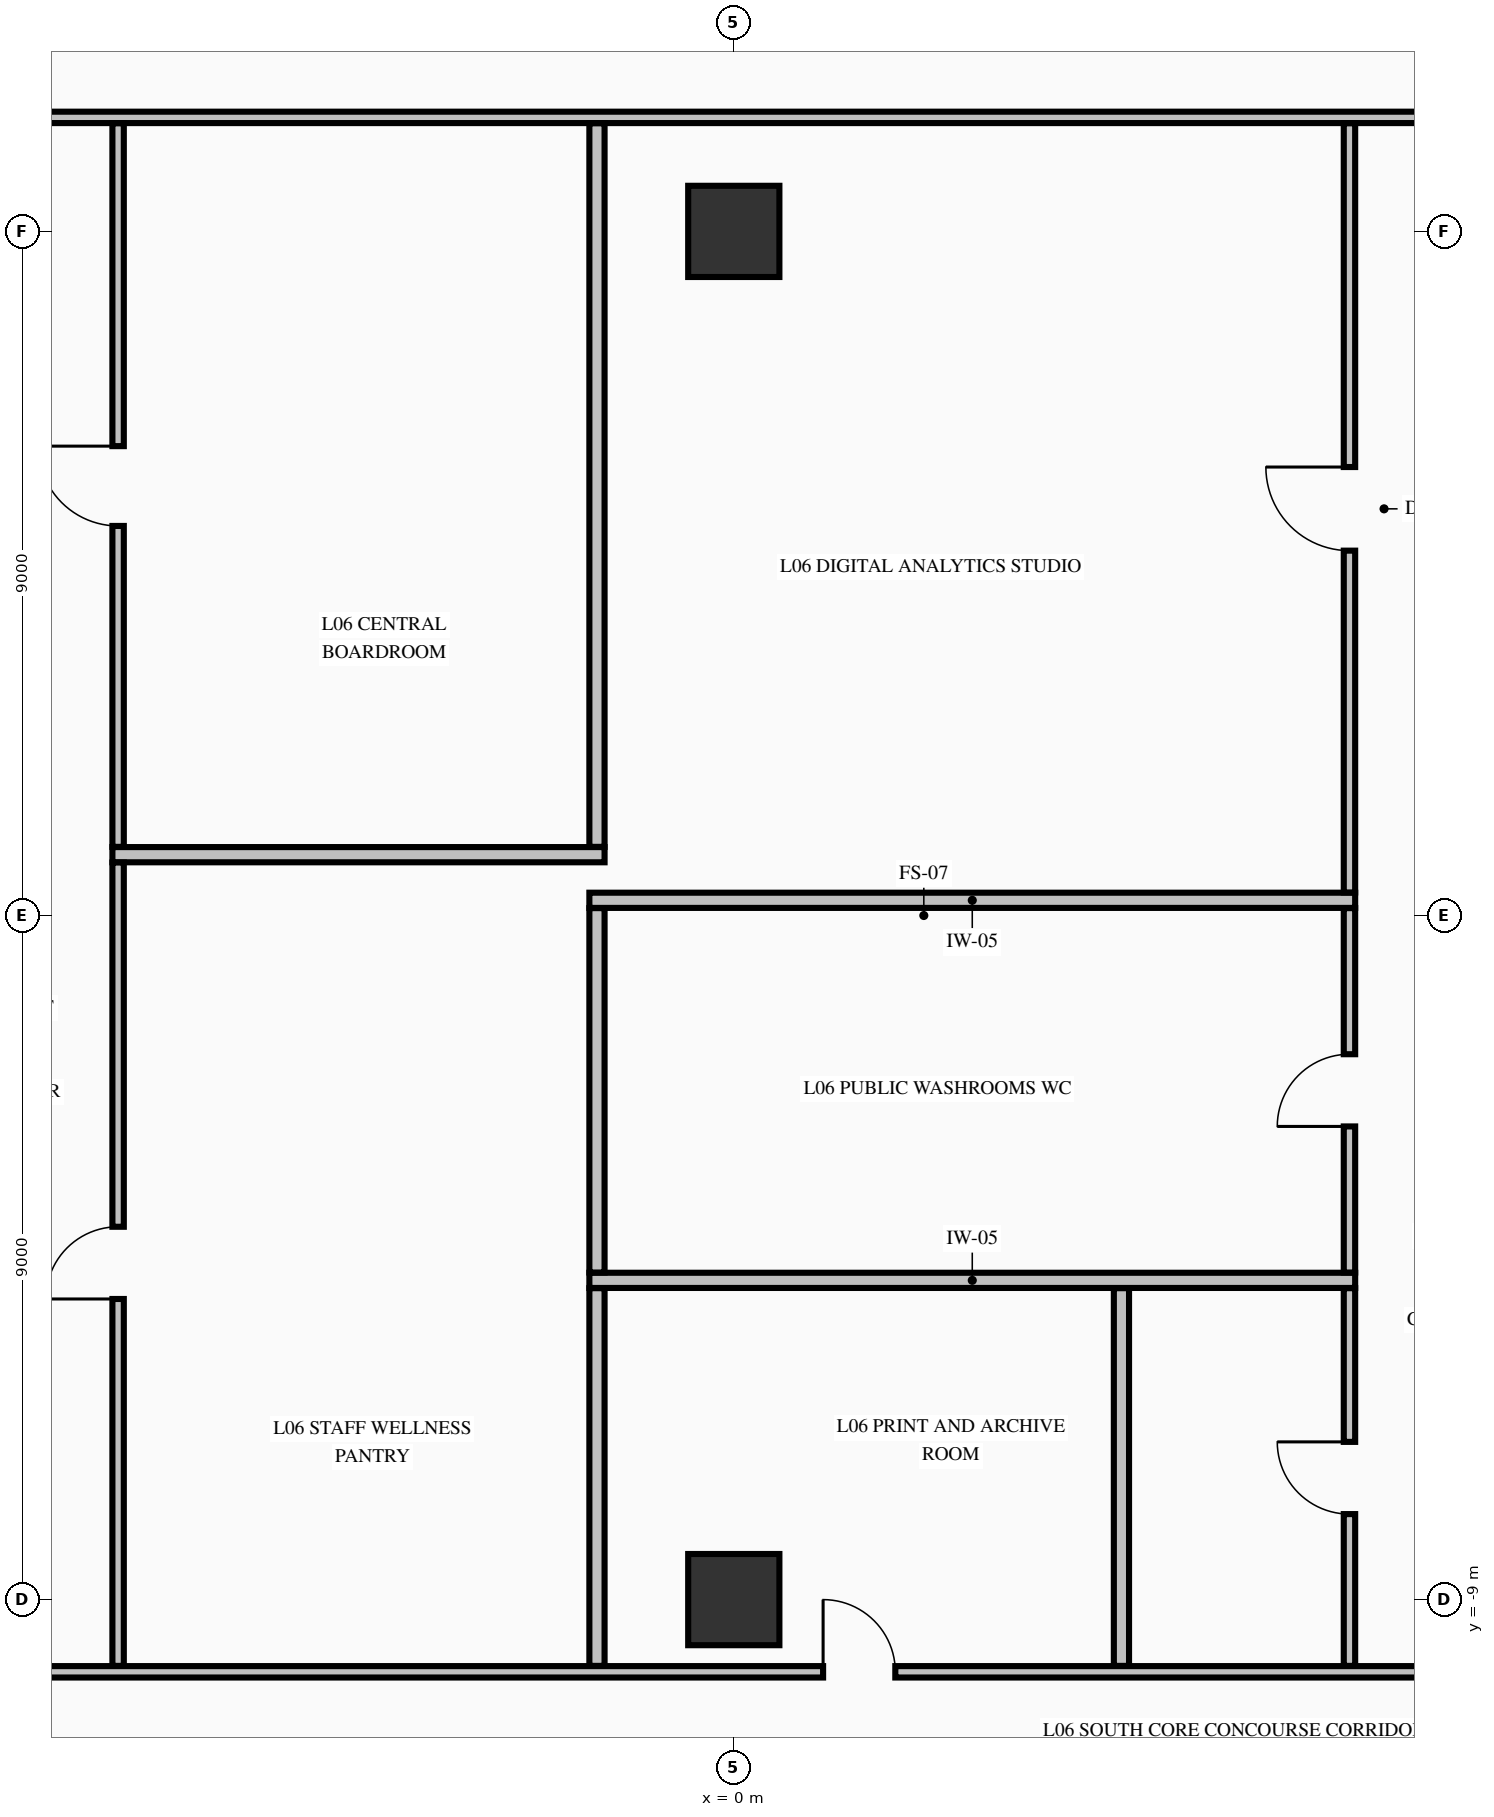
"""IFC4 building model, lengths in metres.
Left out: names, types, materials, properties, quantities, classifications, styles, units other than length and angle.
Written with IfcOpenShell. Run it as: python <this file> out.ifc"""

import sys

from ifc_helpers import new_model, si_unit, direction, frame, frame_2d, origin, origin_2d, place, context, subcontext, project, spatial, rectangle, extrude, element, fill, save


model = new_model("IFC4")
c1 = context("Model", 3, precision=1e-05, world=origin(), true_north=direction((0.0, 1.0)))
c2 = subcontext(c1, "Body", "Model", "MODEL_VIEW")
j1 = project(units=[si_unit("LENGTHUNIT", "METRE"), si_unit("PLANEANGLEUNIT", "RADIAN")], contexts=[c1])
p1 = place(None, origin())
s1 = spatial("IfcSite", under=j1, at=p1, CompositionType="ELEMENT")
p2 = place(p1, origin())
s2 = spatial("IfcBuilding", under=s1, at=p2, CompositionType="ELEMENT")
p3 = place(p2, frame((0.0, 0.0, 30.77)))
s3 = spatial("IfcBuildingStorey", under=s2, at=p3, CompositionType="ELEMENT", Elevation=30.77)
for number, where, z_axis, x_axis in (
    (1, (0.0, -9.0, -0.25), (0.0, 0.0, 1.0), (1.0, 0.0, 0.0)),
    (2, (0.0, 9.0, -0.25), (0.0, 0.0, 1.0), (1.0, 0.0, 0.0)),
):
    element("IfcColumn", number, at=place(p3, frame(where, z_axis=z_axis, x_axis=x_axis)), inside=s3, PredefinedType="COLUMN", context=c2, shape_type="SweptSolid", body=[
        extrude(rectangle(XDim=1.2, YDim=1.2, at=origin_2d()), origin(), (0.0, 0.0, 1.0), 3.52),
    ])
p4 = place(p3, frame((-10.394, -9.95, 0.0), z_axis=(0.0, 0.0, 1.0), x_axis=(1.0, 0.0, 0.0)))
e3 = element("IfcWall", 3, at=p4, inside=s3, PredefinedType="PARTITIONING", context=c2, shape_type="SweptSolid", body=[
    extrude(rectangle(XDim=20.788, YDim=0.15, at=frame_2d((10.394, 0.0))), origin(), (0.0, 0.0, 1.0), 3.27),
])
p5 = place(p4, frame((0.319, 0.0, 0.0)))
e4 = element("IfcOpeningElement", 4, at=p5, cuts=e3, PredefinedType="OPENING", context=c2, shape_type="SweptSolid", body=[
    extrude(rectangle(XDim=1.05, YDim=2.15, at=frame_2d((0.525, 1.075))), frame((0.0, 0.085, 0.0), z_axis=(0.0, -1.0, 0.0), x_axis=(1.0, 0.0, 0.0)), (0.0, 0.0, 1.0), 0.17),
])
p6 = place(p4, frame((19.419, 0.0, 0.0)))
e5 = element("IfcOpeningElement", 5, at=p6, cuts=e3, PredefinedType="OPENING", context=c2, shape_type="SweptSolid", body=[
    extrude(rectangle(XDim=1.05, YDim=2.15, at=frame_2d((0.525, 1.075))), frame((0.0, 0.085, 0.0), z_axis=(0.0, -1.0, 0.0), x_axis=(1.0, 0.0, 0.0)), (0.0, 0.0, 1.0), 0.17),
])
p7 = place(p4, frame((11.569, 0.0, 0.0)))
e6 = element("IfcOpeningElement", 6, at=p7, cuts=e3, PredefinedType="OPENING", context=c2, shape_type="SweptSolid", body=[
    extrude(rectangle(XDim=0.95, YDim=2.15, at=frame_2d((0.475, 1.075))), frame((0.0, 0.085, 0.0), z_axis=(0.0, -1.0, 0.0), x_axis=(1.0, 0.0, 0.0)), (0.0, 0.0, 1.0), 0.17),
])
for number, where, z_axis, x_axis in (
    (7, (-1.9, -4.8, 0.0), (0.0, 0.0, 1.0), (1.0, 0.0, 0.0)),
    (8, (-1.9, 0.2, 0.0), (0.0, 0.0, 1.0), (1.0, 0.0, 0.0)),
):
    element("IfcWall", number, at=place(p3, frame(where, z_axis=z_axis, x_axis=x_axis)), inside=s3, PredefinedType="PARTITIONING", context=c2, shape_type="SweptSolid", body=[
        extrude(rectangle(XDim=10.075, YDim=0.2, at=frame_2d((5.038, 0.0))), origin(), (0.0, 0.0, 1.0), 3.27),
    ])
p8 = place(p3, frame((-8.175, 0.8, 0.0), z_axis=(0.0, 0.0, 1.0), x_axis=(1.0, 0.0, 0.0)))
e9 = element("IfcWall", 9, at=p8, inside=s3, PredefinedType="PARTITIONING", context=c2, shape_type="SweptSolid", body=[
    extrude(rectangle(XDim=6.475, YDim=0.2, at=frame_2d((3.238, 0.0))), origin(), (0.0, 0.0, 1.0), 3.27),
])
p9 = place(p3, frame((-10.394, 10.5, 0.0), z_axis=(0.0, 0.0, 1.0), x_axis=(1.0, 0.0, 0.0)))
e10 = element("IfcWall", 10, at=p9, inside=s3, PredefinedType="PARTITIONING", context=c2, shape_type="SweptSolid", body=[
    extrude(rectangle(XDim=20.788, YDim=0.15, at=frame_2d((10.394, 0.0))), origin(), (0.0, 0.0, 1.0), 3.27),
])
p10 = place(p9, frame((0.319, 0.0, 0.0)))
e11 = element("IfcOpeningElement", 11, at=p10, cuts=e10, PredefinedType="OPENING", context=c2, shape_type="SweptSolid", body=[
    extrude(rectangle(XDim=1.05, YDim=2.15, at=frame_2d((0.525, 1.075))), frame((0.0, 0.085, 0.0), z_axis=(0.0, -1.0, 0.0), x_axis=(1.0, 0.0, 0.0)), (0.0, 0.0, 1.0), 0.17),
])
p11 = place(p9, frame((19.419, 0.0, 0.0)))
e12 = element("IfcOpeningElement", 12, at=p11, cuts=e10, PredefinedType="OPENING", context=c2, shape_type="SweptSolid", body=[
    extrude(rectangle(XDim=1.05, YDim=2.15, at=frame_2d((0.525, 1.075))), frame((0.0, 0.085, 0.0), z_axis=(0.0, -1.0, 0.0), x_axis=(1.0, 0.0, 0.0)), (0.0, 0.0, 1.0), 0.17),
])
p12 = place(p3, frame((-8.1, -9.872, 0.0), z_axis=(0.0, 0.0, 1.0), x_axis=(0.0, 1.0, 0.0)))
e13 = element("IfcWall", 13, at=p12, inside=s3, PredefinedType="PARTITIONING", context=c2, shape_type="SweptSolid", body=[
    extrude(rectangle(XDim=10.569, YDim=0.15, at=frame_2d((5.285, 0.0))), origin(), (0.0, 0.0, 1.0), 3.27),
])
p13 = place(p12, frame((4.827, 0.0, 0.0)))
e14 = element("IfcOpeningElement", 14, at=p13, cuts=e13, PredefinedType="OPENING", context=c2, shape_type="SweptSolid", body=[
    extrude(rectangle(XDim=0.95, YDim=2.15, at=frame_2d((0.475, 1.075))), frame((0.0, 0.085, 0.0), z_axis=(0.0, -1.0, 0.0), x_axis=(1.0, 0.0, 0.0)), (0.0, 0.0, 1.0), 0.17),
])
p14 = place(p3, frame((-8.1, 0.903, 0.0), z_axis=(0.0, 0.0, 1.0), x_axis=(0.0, 1.0, 0.0)))
e15 = element("IfcWall", 15, at=p14, inside=s3, PredefinedType="PARTITIONING", context=c2, shape_type="SweptSolid", body=[
    extrude(rectangle(XDim=9.519, YDim=0.15, at=frame_2d((4.76, 0.0))), origin(), (0.0, 0.0, 1.0), 3.27),
])
p15 = place(p14, frame((4.222, 0.0, 0.0)))
e16 = element("IfcOpeningElement", 16, at=p15, cuts=e15, PredefinedType="OPENING", context=c2, shape_type="SweptSolid", body=[
    extrude(rectangle(XDim=1.05, YDim=2.15, at=frame_2d((0.525, 1.075))), frame((0.0, 0.085, 0.0), z_axis=(0.0, -1.0, 0.0), x_axis=(1.0, 0.0, 0.0)), (0.0, 0.0, 1.0), 0.17),
])
p16 = place(p3, frame((-1.8, -9.872, 0.0), z_axis=(0.0, 0.0, 1.0), x_axis=(0.0, 1.0, 0.0)))
e17 = element("IfcWall", 17, at=p16, inside=s3, PredefinedType="PARTITIONING", context=c2, shape_type="SweptSolid", body=[
    extrude(rectangle(XDim=4.969, YDim=0.2, at=frame_2d((2.484, 0.0))), origin(), (0.0, 0.0, 1.0), 3.27),
])
p17 = place(p3, frame((-1.8, -4.697, 0.0), z_axis=(0.0, 0.0, 1.0), x_axis=(0.0, 1.0, 0.0)))
e18 = element("IfcWall", 18, at=p17, inside=s3, PredefinedType="PARTITIONING", context=c2, shape_type="SweptSolid", body=[
    extrude(rectangle(XDim=4.794, YDim=0.2, at=frame_2d((2.397, 0.0))), origin(), (0.0, 0.0, 1.0), 3.27),
])
p18 = place(p3, frame((-1.8, 0.903, 0.0), z_axis=(0.0, 0.0, 1.0), x_axis=(0.0, 1.0, 0.0)))
e19 = element("IfcWall", 19, at=p18, inside=s3, PredefinedType="PARTITIONING", context=c2, shape_type="SweptSolid", body=[
    extrude(rectangle(XDim=9.519, YDim=0.2, at=frame_2d((4.76, 0.0))), origin(), (0.0, 0.0, 1.0), 3.27),
])
p19 = place(p3, frame((5.1, -9.872, 0.0), z_axis=(0.0, 0.0, 1.0), x_axis=(0.0, 1.0, 0.0)))
e20 = element("IfcWall", 20, at=p19, inside=s3, PredefinedType="PARTITIONING", context=c2, shape_type="SweptSolid", body=[
    extrude(rectangle(XDim=4.969, YDim=0.2, at=frame_2d((2.484, 0.0))), origin(), (0.0, 0.0, 1.0), 3.27),
])
p20 = place(p3, frame((8.1, -9.872, 0.0), z_axis=(0.0, 0.0, 1.0), x_axis=(0.0, 1.0, 0.0)))
e21 = element("IfcWall", 21, at=p20, inside=s3, PredefinedType="PARTITIONING", context=c2, shape_type="SweptSolid", body=[
    extrude(rectangle(XDim=4.969, YDim=0.15, at=frame_2d((2.484, 0.0))), origin(), (0.0, 0.0, 1.0), 3.27),
])
p21 = place(p20, frame((1.997, 0.0, 0.0)))
e22 = element("IfcOpeningElement", 22, at=p21, cuts=e21, PredefinedType="OPENING", context=c2, shape_type="SweptSolid", body=[
    extrude(rectangle(XDim=0.95, YDim=2.15, at=frame_2d((0.475, 1.075))), frame((0.0, 0.085, 0.0), z_axis=(0.0, -1.0, 0.0), x_axis=(1.0, 0.0, 0.0)), (0.0, 0.0, 1.0), 0.17),
])
p22 = place(p3, frame((8.1, -4.697, 0.0), z_axis=(0.0, 0.0, 1.0), x_axis=(0.0, 1.0, 0.0)))
e23 = element("IfcWall", 23, at=p22, inside=s3, PredefinedType="PARTITIONING", context=c2, shape_type="SweptSolid", body=[
    extrude(rectangle(XDim=4.794, YDim=0.15, at=frame_2d((2.397, 0.0))), origin(), (0.0, 0.0, 1.0), 3.27),
])
p23 = place(p22, frame((1.922, 0.0, 0.0)))
e24 = element("IfcOpeningElement", 24, at=p23, cuts=e23, PredefinedType="OPENING", context=c2, shape_type="SweptSolid", body=[
    extrude(rectangle(XDim=0.95, YDim=2.15, at=frame_2d((0.475, 1.075))), frame((0.0, 0.085, 0.0), z_axis=(0.0, -1.0, 0.0), x_axis=(1.0, 0.0, 0.0)), (0.0, 0.0, 1.0), 0.17),
])
p24 = place(p3, frame((8.1, 0.303, 0.0), z_axis=(0.0, 0.0, 1.0), x_axis=(0.0, 1.0, 0.0)))
e25 = element("IfcWall", 25, at=p24, inside=s3, PredefinedType="PARTITIONING", context=c2, shape_type="SweptSolid", body=[
    extrude(rectangle(XDim=10.119, YDim=0.15, at=frame_2d((5.06, 0.0))), origin(), (0.0, 0.0, 1.0), 3.27),
])
p25 = place(p24, frame((4.497, 0.0, 0.0)))
e26 = element("IfcOpeningElement", 26, at=p25, cuts=e25, PredefinedType="OPENING", context=c2, shape_type="SweptSolid", body=[
    extrude(rectangle(XDim=1.1, YDim=2.15, at=frame_2d((0.55, 1.075))), frame((0.0, 0.085, 0.0), z_axis=(0.0, -1.0, 0.0), x_axis=(1.0, 0.0, 0.0)), (0.0, 0.0, 1.0), 0.17),
])
p26 = place(p15, origin())
e27 = element("IfcDoor", 27, at=p26, inside=s3, OperationType="SINGLE_SWING_RIGHT", PredefinedType="DOOR", context=c2, shape_type="SweptSolid", body=[
    extrude(rectangle(XDim=1.05, YDim=2.15, at=frame_2d((0.525, 1.075))), frame((0.0, 0.025, 0.0), z_axis=(0.0, -1.0, 0.0), x_axis=(1.0, 0.0, 0.0)), (0.0, 0.0, 1.0), 0.05),
])
fill(e16, e27)
p27 = place(p13, origin())
e28 = element("IfcDoor", 28, at=p27, inside=s3, OperationType="SINGLE_SWING_LEFT", PredefinedType="DOOR", context=c2, shape_type="SweptSolid", body=[
    extrude(rectangle(XDim=0.95, YDim=2.15, at=frame_2d((0.475, 1.075))), frame((0.0, 0.025, 0.0), z_axis=(0.0, -1.0, 0.0), x_axis=(1.0, 0.0, 0.0)), (0.0, 0.0, 1.0), 0.05),
])
fill(e14, e28)
p28 = place(p25, origin())
e29 = element("IfcDoor", 29, at=p28, inside=s3, OperationType="SINGLE_SWING_RIGHT", PredefinedType="DOOR", context=c2, shape_type="SweptSolid", body=[
    extrude(rectangle(XDim=1.1, YDim=2.15, at=frame_2d((0.55, 1.075))), frame((0.0, 0.025, 0.0), z_axis=(0.0, -1.0, 0.0), x_axis=(1.0, 0.0, 0.0)), (0.0, 0.0, 1.0), 0.05),
])
fill(e26, e29)
p29 = place(p23, origin())
e30 = element("IfcDoor", 30, at=p29, inside=s3, OperationType="SINGLE_SWING_LEFT", PredefinedType="DOOR", context=c2, shape_type="SweptSolid", body=[
    extrude(rectangle(XDim=0.95, YDim=2.15, at=frame_2d((0.475, 1.075))), frame((0.0, 0.025, 0.0), z_axis=(0.0, -1.0, 0.0), x_axis=(1.0, 0.0, 0.0)), (0.0, 0.0, 1.0), 0.05),
])
fill(e24, e30)
p30 = place(p21, origin())
e31 = element("IfcDoor", 31, at=p30, inside=s3, OperationType="SINGLE_SWING_RIGHT", PredefinedType="DOOR", context=c2, shape_type="SweptSolid", body=[
    extrude(rectangle(XDim=0.95, YDim=2.15, at=frame_2d((0.475, 1.075))), frame((0.0, 0.025, 0.0), z_axis=(0.0, -1.0, 0.0), x_axis=(1.0, 0.0, 0.0)), (0.0, 0.0, 1.0), 0.05),
])
fill(e22, e31)
p31 = place(p7, origin())
e32 = element("IfcDoor", 32, at=p31, inside=s3, OperationType="SINGLE_SWING_LEFT", PredefinedType="DOOR", context=c2, shape_type="SweptSolid", body=[
    extrude(rectangle(XDim=0.95, YDim=2.15, at=frame_2d((0.475, 1.075))), frame((0.0, 0.025, 0.0), z_axis=(0.0, -1.0, 0.0), x_axis=(1.0, 0.0, 0.0)), (0.0, 0.0, 1.0), 0.05),
])
fill(e6, e32)
save(model, sys.argv[1])
